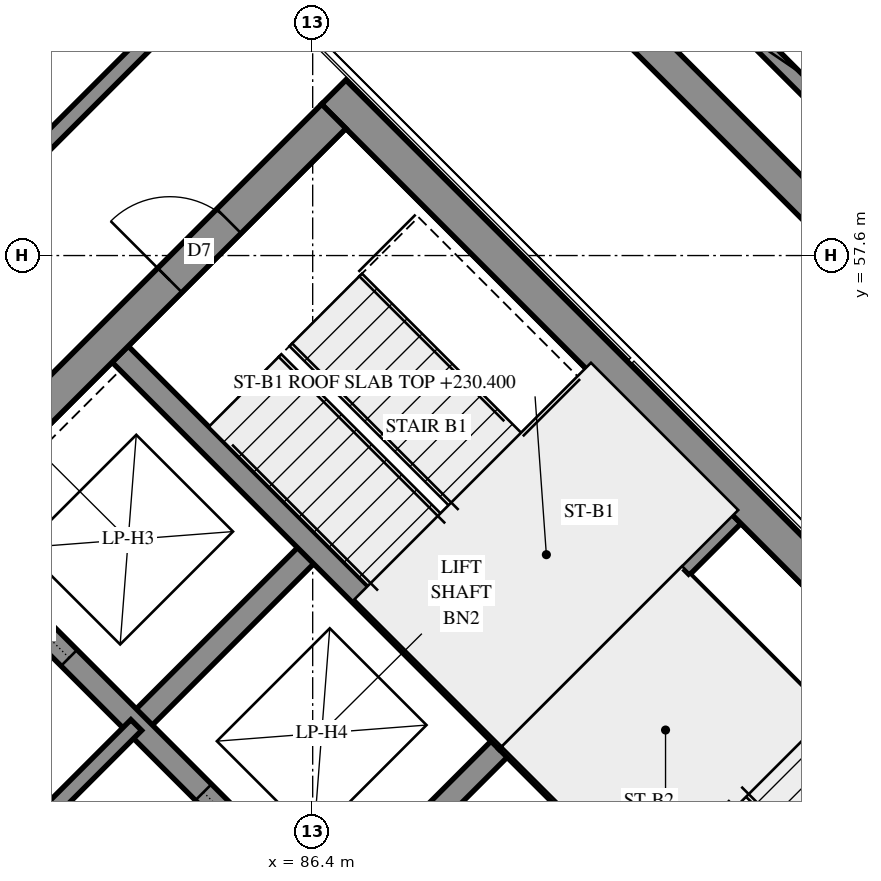
"""IFC4 building model, lengths in metres.
Left out: names, types, materials, properties, quantities, classifications, styles, units other than length and angle.
Written with IfcOpenShell. Run it as: python <this file> out.ifc"""

import sys

from ifc_helpers import new_model, si_unit, direction, frame, frame_2d, origin, place, context, subcontext, project, spatial, polyline, rectangle, outline, extrude, element, fill, save


model = new_model("IFC4")
c1 = context("Model", 3, precision=1e-05, world=origin(), true_north=direction((0.0, 1.0)))
c2 = subcontext(c1, "Body", "Model", "MODEL_VIEW")
j1 = project(units=[si_unit("LENGTHUNIT", "METRE"), si_unit("PLANEANGLEUNIT", "RADIAN")], contexts=[c1])
p1 = place(None, origin())
s1 = spatial("IfcSite", under=j1, at=p1, CompositionType="ELEMENT")
p2 = place(p1, origin())
s2 = spatial("IfcBuilding", under=s1, at=p2, CompositionType="ELEMENT")
p3 = place(p2, frame((0.0, 0.0, 230.4)))
s3 = spatial("IfcBuildingStorey", under=s2, at=p3, CompositionType="ELEMENT", Elevation=230.4)
p4 = place(p3, frame((86.678, 59.749, -0.3), z_axis=(0.0, 0.0, 1.0), x_axis=(0.7071035132, -0.7071100491, 0.0)))
e1 = element("IfcWall", 1, at=p4, inside=s3, PredefinedType="SHEAR", context=c2, shape_type="SweptSolid", body=[
    extrude(rectangle(XDim=15.3, YDim=0.45, at=frame_2d((7.65, 0.0))), origin(), (0.0, 0.0, 1.0), 3.5),
])
p5 = place(p4, frame((10.45, 0.0, 0.3)))
e2 = element("IfcOpeningElement", 2, at=p5, cuts=e1, PredefinedType="OPENING", context=c2, shape_type="SweptSolid", body=[
    extrude(rectangle(XDim=0.8, YDim=2.1, at=frame_2d((0.4, 1.05))), frame((0.0, 0.235, 0.0), z_axis=(0.0, -1.0, 0.0), x_axis=(1.0, 0.0, 0.0)), (0.0, 0.0, 1.0), 0.47),
])
p6 = place(p3, frame((76.495, 49.249, -0.3), z_axis=(0.0, 0.0, 1.0), x_axis=(0.7071067812, 0.7071067812, 0.0)))
e3 = element("IfcWall", 3, at=p6, inside=s3, PredefinedType="SHEAR", context=c2, shape_type="SweptSolid", body=[
    extrude(rectangle(XDim=14.4, YDim=0.45, at=frame_2d((7.2, 0.0))), origin(), (0.0, 0.0, 1.0), 3.5),
])
p7 = place(p6, frame((4.55, 0.0, 0.3)))
e4 = element("IfcOpeningElement", 4, at=p7, cuts=e3, PredefinedType="OPENING", context=c2, shape_type="SweptSolid", body=[
    extrude(rectangle(XDim=1.1, YDim=2.1, at=frame_2d((0.55, 1.05))), frame((0.0, 0.235, 0.0), z_axis=(0.0, -1.0, 0.0), x_axis=(1.0, 0.0, 0.0)), (0.0, 0.0, 1.0), 0.47),
])
p8 = place(p6, frame((11.35, 0.0, 0.3)))
e5 = element("IfcOpeningElement", 5, at=p8, cuts=e3, PredefinedType="OPENING", context=c2, shape_type="SweptSolid", body=[
    extrude(rectangle(XDim=1.1, YDim=2.1, at=frame_2d((0.55, 1.05))), frame((0.0, 0.235, 0.0), z_axis=(0.0, -1.0, 0.0), x_axis=(1.0, 0.0, 0.0)), (0.0, 0.0, 1.0), 0.47),
])
p9 = place(p3, frame((84.079, 51.423, 0.0), z_axis=(0.0, 0.0, 1.0), x_axis=(0.7071219326, 0.7070916295, 0.0)))
e6 = element("IfcWall", 6, at=p9, inside=s3, PredefinedType="SOLIDWALL", context=c2, shape_type="SweptSolid", body=[
    extrude(rectangle(XDim=3.3, YDim=0.3, at=frame_2d((1.65, 0.0))), origin(), (0.0, 0.0, 1.0), 3.9),
])
p10 = place(p3, frame((86.625, 48.878, 0.0), z_axis=(0.0, 0.0, 1.0), x_axis=(0.7071067812, 0.7071067812, 0.0)))
e7 = element("IfcWall", 7, at=p10, inside=s3, PredefinedType="SOLIDWALL", context=c2, shape_type="SweptSolid", body=[
    extrude(rectangle(XDim=3.3, YDim=0.3, at=frame_2d((1.65, 0.0))), origin(), (0.0, 0.0, 1.0), 3.9),
])
p11 = place(p3, frame((78.988, 51.423, 0.0), z_axis=(0.0, 0.0, 1.0), x_axis=(0.7071067812, -0.7071067812, 0.0)))
e8 = element("IfcWall", 8, at=p11, inside=s3, PredefinedType="SOLIDWALL", context=c2, shape_type="SweptSolid", body=[
    extrude(rectangle(XDim=14.4, YDim=0.3, at=frame_2d((7.2, 0.0))), origin(), (0.0, 0.0, 1.0), 3.9),
])
p12 = place(p11, frame((1.35, 0.0, 0.0)))
e9 = element("IfcOpeningElement", 9, at=p12, cuts=e8, PredefinedType="OPENING", context=c2, shape_type="SweptSolid", body=[
    extrude(rectangle(XDim=0.9, YDim=2.1, at=frame_2d((0.45, 1.05))), frame((0.0, 0.16, 0.0), z_axis=(0.0, -1.0, 0.0), x_axis=(1.0, 0.0, 0.0)), (0.0, 0.0, 1.0), 0.32),
])
p13 = place(p11, frame((4.95, 0.0, 0.0)))
e10 = element("IfcOpeningElement", 10, at=p13, cuts=e8, PredefinedType="OPENING", context=c2, shape_type="SweptSolid", body=[
    extrude(rectangle(XDim=0.9, YDim=2.1, at=frame_2d((0.45, 1.05))), frame((0.0, 0.16, 0.0), z_axis=(0.0, -1.0, 0.0), x_axis=(1.0, 0.0, 0.0)), (0.0, 0.0, 1.0), 0.32),
])
p14 = place(p11, frame((8.55, 0.0, 0.0)))
e11 = element("IfcOpeningElement", 11, at=p14, cuts=e8, PredefinedType="OPENING", context=c2, shape_type="SweptSolid", body=[
    extrude(rectangle(XDim=0.9, YDim=2.1, at=frame_2d((0.45, 1.05))), frame((0.0, 0.16, 0.0), z_axis=(0.0, -1.0, 0.0), x_axis=(1.0, 0.0, 0.0)), (0.0, 0.0, 1.0), 0.32),
])
p15 = place(p11, frame((12.05, 0.0, 0.0)))
e12 = element("IfcOpeningElement", 12, at=p15, cuts=e8, PredefinedType="OPENING", context=c2, shape_type="SweptSolid", body=[
    extrude(rectangle(XDim=1.1, YDim=2.1, at=frame_2d((0.55, 1.05))), frame((0.0, 0.16, 0.0), z_axis=(0.0, -1.0, 0.0), x_axis=(1.0, 0.0, 0.0)), (0.0, 0.0, 1.0), 0.32),
])
p16 = place(p3, frame((81.534, 53.969, 0.0), z_axis=(0.0, 0.0, 1.0), x_axis=(0.707103309, -0.7071102534, 0.0)))
e13 = element("IfcWall", 13, at=p16, inside=s3, PredefinedType="SOLIDWALL", context=c2, shape_type="SweptSolid", body=[
    extrude(rectangle(XDim=14.4, YDim=0.3, at=frame_2d((7.2, 0.0))), origin(), (0.0, 0.0, 1.0), 3.9),
])
p17 = place(p16, frame((1.25, 0.0, 0.0)))
e14 = element("IfcOpeningElement", 14, at=p17, cuts=e13, PredefinedType="OPENING", context=c2, shape_type="SweptSolid", body=[
    extrude(rectangle(XDim=1.1, YDim=2.1, at=frame_2d((0.55, 1.05))), frame((0.0, 0.16, 0.0), z_axis=(0.0, -1.0, 0.0), x_axis=(1.0, 0.0, 0.0)), (0.0, 0.0, 1.0), 0.32),
])
p18 = place(p16, frame((4.85, 0.0, 0.0)))
e15 = element("IfcOpeningElement", 15, at=p18, cuts=e13, PredefinedType="OPENING", context=c2, shape_type="SweptSolid", body=[
    extrude(rectangle(XDim=1.1, YDim=2.1, at=frame_2d((0.55, 1.05))), frame((0.0, 0.16, 0.0), z_axis=(0.0, -1.0, 0.0), x_axis=(1.0, 0.0, 0.0)), (0.0, 0.0, 1.0), 0.32),
])
p19 = place(p16, frame((8.45, 0.0, 0.0)))
e16 = element("IfcOpeningElement", 16, at=p19, cuts=e13, PredefinedType="OPENING", context=c2, shape_type="SweptSolid", body=[
    extrude(rectangle(XDim=1.1, YDim=2.1, at=frame_2d((0.55, 1.05))), frame((0.0, 0.16, 0.0), z_axis=(0.0, -1.0, 0.0), x_axis=(1.0, 0.0, 0.0)), (0.0, 0.0, 1.0), 0.32),
])
p20 = place(p16, frame((12.05, 0.0, 0.0)))
e17 = element("IfcOpeningElement", 17, at=p20, cuts=e13, PredefinedType="OPENING", context=c2, shape_type="SweptSolid", body=[
    extrude(rectangle(XDim=1.1, YDim=2.1, at=frame_2d((0.55, 1.05))), frame((0.0, 0.16, 0.0), z_axis=(0.0, -1.0, 0.0), x_axis=(1.0, 0.0, 0.0)), (0.0, 0.0, 1.0), 0.32),
])
for number, where, z_axis, x_axis in (
    (18, (83.867, 56.302, 0.0), (0.0, 0.0, 1.0), (0.707, -0.707, 0.0)),
    (19, (88.958, 51.211, 0.0), (0.0, 0.0, 1.0), (0.707, -0.707, 0.0)),
):
    element("IfcWall", number, at=place(p3, frame(where, z_axis=z_axis, x_axis=x_axis)), inside=s3, PredefinedType="SOLIDWALL", context=c2, shape_type="SweptSolid", body=[
        extrude(rectangle(XDim=7.2, YDim=0.3, at=frame_2d((3.6, 0.0))), origin(), (0.0, 0.0, 1.0), 3.9),
    ])
p21 = place(p3, frame((88.958, 51.211, 0.0), z_axis=(0.0, 0.0, 1.0), x_axis=(0.7071067812, 0.7071067812, 0.0)))
e20 = element("IfcWall", 20, at=p21, inside=s3, PredefinedType="SOLIDWALL", context=c2, shape_type="SweptSolid", body=[
    extrude(rectangle(XDim=4.2, YDim=0.3, at=frame_2d((2.1, 0.0))), origin(), (0.0, 0.0, 1.0), 3.9),
])
p22 = place(p3, frame((102.747, 49.938, 0.0), z_axis=(0.0, 0.0, 1.0), x_axis=(-0.7071083109, 0.7071052514, 0.0)))
e21 = element("IfcWall", 21, at=p22, inside=s3, PredefinedType="SOLIDWALL", context=c2, shape_type="SweptSolid", body=[
    extrude(outline(polyline([(-0.1, -0.1), (32.726, -0.1), (32.644, 0.1), (0.1, 0.1), (-0.1, -0.1)])), origin(), (0.0, 0.0, 1.0), 4.2),
])
p23 = place(p3, frame((91.313, 53.354, 0.0), z_axis=(0.0, 0.0, 1.0), x_axis=(0.7071067812, -0.7071067812, 0.0)))
e22 = element("IfcWall", 22, at=p23, inside=s3, PredefinedType="PARTITIONING", context=c2, shape_type="SweptSolid", body=[
    extrude(rectangle(XDim=5.65, YDim=0.15, at=frame_2d((2.825, 0.0))), origin(), (0.0, 0.0, 1.0), 3.9),
])
p24 = place(p3, frame((81.534, 48.878, 0.0), z_axis=(0.0, 0.0, 1.0), x_axis=(0.707092892, 0.7071206701, 0.0)))
e23 = element("IfcWall", 23, at=p24, inside=s3, PredefinedType="PARTITIONING", context=c2, shape_type="SweptSolid", body=[
    extrude(rectangle(XDim=3.6, YDim=0.2, at=frame_2d((1.8, 0.0))), origin(), (0.0, 0.0, 1.0), 3.9),
])
p25 = place(p3, frame((80.851, 57.035, 0.0), z_axis=(0.0, 0.0, 1.0), x_axis=(0.7071067812, 0.7071067812, 0.0)))
e24 = element("IfcWall", 24, at=p25, inside=s3, PredefinedType="PARTITIONING", context=c2, shape_type="SweptSolid", body=[
    extrude(rectangle(XDim=6.285, YDim=0.2, at=frame_2d((3.142, 0.0))), origin(), (0.0, 0.0, 1.0), 3.9),
])
p26 = place(p25, frame((0.81, 0.0, 0.0)))
e25 = element("IfcOpeningElement", 25, at=p26, cuts=e24, PredefinedType="OPENING", context=c2, shape_type="SweptSolid", body=[
    extrude(rectangle(XDim=1.0, YDim=2.1, at=frame_2d((0.5, 1.05))), frame((0.0, 0.11, 0.0), z_axis=(0.0, -1.0, 0.0), x_axis=(1.0, 0.0, 0.0)), (0.0, 0.0, 1.0), 0.22),
])
p27 = place(p8, origin())
e26 = element("IfcDoor", 26, at=p27, inside=s3, OperationType="SINGLE_SWING_LEFT", PredefinedType="DOOR", context=c2, shape_type="SweptSolid", body=[
    extrude(rectangle(XDim=1.1, YDim=2.1, at=frame_2d((0.55, 1.05))), frame((0.0, 0.025, 0.0), z_axis=(0.0, -1.0, 0.0), x_axis=(1.0, 0.0, 0.0)), (0.0, 0.0, 1.0), 0.05),
])
fill(e5, e26)
p28 = place(p17, origin())
e27 = element("IfcDoor", 27, at=p28, inside=s3, OperationType="SLIDING_TO_LEFT", PredefinedType="DOOR", context=c2, shape_type="SweptSolid", body=[
    extrude(rectangle(XDim=1.1, YDim=2.1, at=frame_2d((0.55, 1.05))), frame((0.0, 0.025, 0.0), z_axis=(0.0, -1.0, 0.0), x_axis=(1.0, 0.0, 0.0)), (0.0, 0.0, 1.0), 0.05),
])
fill(e14, e27)
p29 = place(p18, origin())
e28 = element("IfcDoor", 28, at=p29, inside=s3, OperationType="SLIDING_TO_RIGHT", PredefinedType="DOOR", context=c2, shape_type="SweptSolid", body=[
    extrude(rectangle(XDim=1.1, YDim=2.1, at=frame_2d((0.55, 1.05))), frame((0.0, 0.025, 0.0), z_axis=(0.0, -1.0, 0.0), x_axis=(1.0, 0.0, 0.0)), (0.0, 0.0, 1.0), 0.05),
])
fill(e15, e28)
save(model, sys.argv[1])
